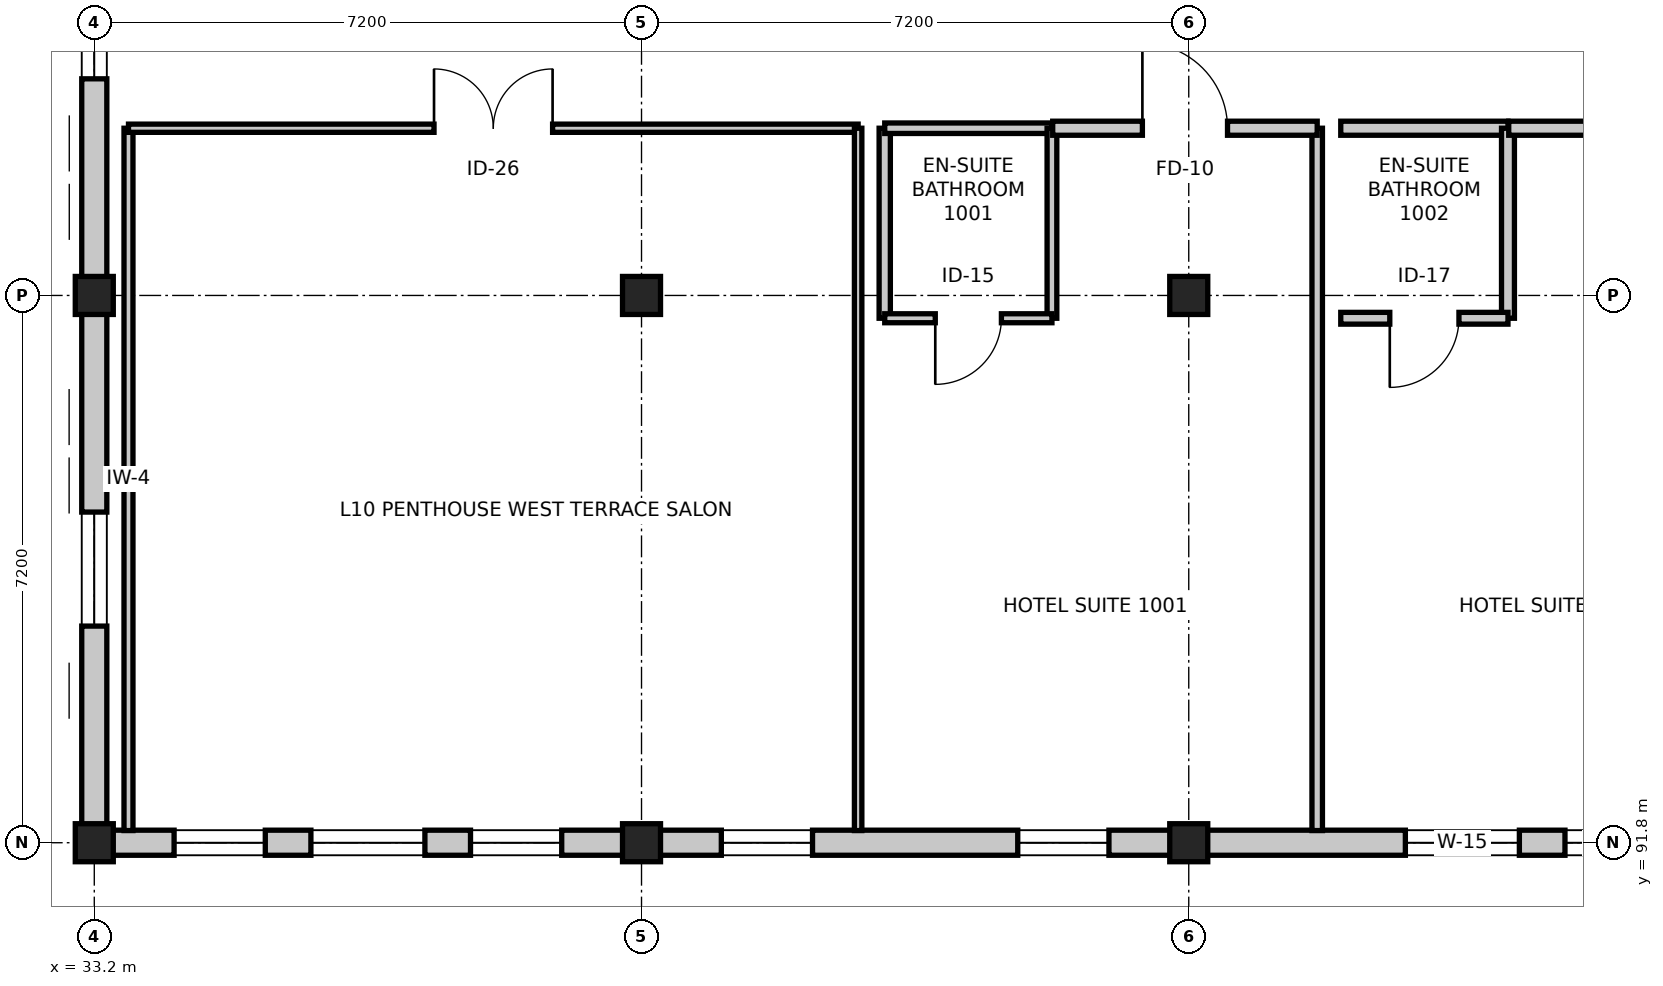
"""IFC4 building model, lengths in metres.
Left out: names, types, materials, properties, quantities, classifications, styles, units other than length and angle.
Written with IfcOpenShell. Run it as: python <this file> out.ifc"""

import sys

from ifc_helpers import new_model, si_unit, direction, frame, frame_2d, origin, origin_2d, place, context, subcontext, project, spatial, rectangle, extrude, element, fill, save


model = new_model("IFC4")
c1 = context("Model", 3, precision=1e-05, world=origin(), true_north=direction((0.0, 1.0)))
c2 = subcontext(c1, "Body", "Model", "MODEL_VIEW")
j1 = project(units=[si_unit("LENGTHUNIT", "METRE"), si_unit("PLANEANGLEUNIT", "RADIAN")], contexts=[c1])
p1 = place(None, origin())
s1 = spatial("IfcSite", under=j1, at=p1, CompositionType="ELEMENT")
p2 = place(p1, origin())
s2 = spatial("IfcBuilding", under=s1, at=p2, CompositionType="ELEMENT")
p3 = place(p2, frame((0.0, 0.0, 40.8)))
s3 = spatial("IfcBuildingStorey", under=s2, at=p3, CompositionType="ELEMENT", Elevation=40.8)
for number, where, z_axis, x_axis in (
    (1, (33.2, 91.8, 0.0), (0.0, 0.0, 1.0), (1.0, 0.0, 0.0)),
    (2, (33.2, 99.0, 0.0), (0.0, 0.0, 1.0), (1.0, 0.0, 0.0)),
    (3, (40.4, 91.8, 0.0), (0.0, 0.0, 1.0), (1.0, 0.0, 0.0)),
    (4, (40.4, 99.0, 0.0), (0.0, 0.0, 1.0), (1.0, 0.0, 0.0)),
    (5, (47.6, 91.8, 0.0), (0.0, 0.0, 1.0), (1.0, 0.0, 0.0)),
    (6, (47.6, 99.0, 0.0), (0.0, 0.0, 1.0), (1.0, 0.0, 0.0)),
):
    element("IfcColumn", number, at=place(p3, frame(where, z_axis=z_axis, x_axis=x_axis)), inside=s3, PredefinedType="COLUMN", context=c2, shape_type="SweptSolid", body=[
        extrude(rectangle(XDim=0.5, YDim=0.5, at=origin_2d()), origin(), (0.0, 0.0, 1.0), 3.6),
    ])
p4 = place(p3, frame((54.8, 91.8, 0.0), z_axis=(0.0, 0.0, 1.0), x_axis=(-1.0, 0.0, 0.0)))
e7 = element("IfcWall", 7, at=p4, inside=s3, PredefinedType="STANDARD", context=c2, shape_type="SweptSolid", body=[
    extrude(rectangle(XDim=7.2, YDim=0.33, at=frame_2d((3.6, 0.0))), origin(), (0.0, 0.0, 1.0), 2.765),
])
p5 = place(p4, frame((2.85, 0.0, 0.75)))
e8 = element("IfcOpeningElement", 8, at=p5, cuts=e7, PredefinedType="OPENING", context=c2, shape_type="SweptSolid", body=[
    extrude(rectangle(XDim=1.5, YDim=1.5, at=frame_2d((0.75, 0.75))), frame((0.0, 0.175, 0.0), z_axis=(0.0, -1.0, 0.0), x_axis=(1.0, 0.0, 0.0)), (0.0, 0.0, 1.0), 0.35),
])
p6 = place(p4, frame((1.05, 0.0, 0.85)))
e9 = element("IfcOpeningElement", 9, at=p6, cuts=e7, PredefinedType="OPENING", context=c2, shape_type="SweptSolid", body=[
    extrude(rectangle(XDim=1.2, YDim=1.8, at=frame_2d((0.6, 0.9))), frame((0.0, 0.175, 0.0), z_axis=(0.0, -1.0, 0.0), x_axis=(1.0, 0.0, 0.0)), (0.0, 0.0, 1.0), 0.35),
])
p7 = place(p3, frame((47.6, 91.8, 0.0), z_axis=(0.0, 0.0, 1.0), x_axis=(-1.0, 0.0, 0.0)))
e10 = element("IfcWall", 10, at=p7, inside=s3, PredefinedType="STANDARD", context=c2, shape_type="SweptSolid", body=[
    extrude(rectangle(XDim=7.2, YDim=0.33, at=frame_2d((3.6, 0.0))), origin(), (0.0, 0.0, 1.0), 2.765),
])
p8 = place(p7, frame((1.05, 0.0, 0.85)))
e11 = element("IfcOpeningElement", 11, at=p8, cuts=e10, PredefinedType="OPENING", context=c2, shape_type="SweptSolid", body=[
    extrude(rectangle(XDim=1.2, YDim=1.8, at=frame_2d((0.6, 0.9))), frame((0.0, 0.175, 0.0), z_axis=(0.0, -1.0, 0.0), x_axis=(1.0, 0.0, 0.0)), (0.0, 0.0, 1.0), 0.35),
])
p9 = place(p7, frame((4.95, 0.0, 0.85)))
e12 = element("IfcOpeningElement", 12, at=p9, cuts=e10, PredefinedType="OPENING", context=c2, shape_type="SweptSolid", body=[
    extrude(rectangle(XDim=1.2, YDim=1.8, at=frame_2d((0.6, 0.9))), frame((0.0, 0.175, 0.0), z_axis=(0.0, -1.0, 0.0), x_axis=(1.0, 0.0, 0.0)), (0.0, 0.0, 1.0), 0.35),
])
p10 = place(p3, frame((40.4, 91.8, 0.0), z_axis=(0.0, 0.0, 1.0), x_axis=(-1.0, 0.0, 0.0)))
e13 = element("IfcWall", 13, at=p10, inside=s3, PredefinedType="STANDARD", context=c2, shape_type="SweptSolid", body=[
    extrude(rectangle(XDim=7.2, YDim=0.33, at=frame_2d((3.6, 0.0))), origin(), (0.0, 0.0, 1.0), 2.765),
])
p11 = place(p10, frame((2.85, 0.0, 0.75)))
e14 = element("IfcOpeningElement", 14, at=p11, cuts=e13, PredefinedType="OPENING", context=c2, shape_type="SweptSolid", body=[
    extrude(rectangle(XDim=1.5, YDim=1.5, at=frame_2d((0.75, 0.75))), frame((0.0, 0.175, 0.0), z_axis=(0.0, -1.0, 0.0), x_axis=(1.0, 0.0, 0.0)), (0.0, 0.0, 1.0), 0.35),
])
p12 = place(p10, frame((1.05, 0.0, 0.85)))
e15 = element("IfcOpeningElement", 15, at=p12, cuts=e13, PredefinedType="OPENING", context=c2, shape_type="SweptSolid", body=[
    extrude(rectangle(XDim=1.2, YDim=1.8, at=frame_2d((0.6, 0.9))), frame((0.0, 0.175, 0.0), z_axis=(0.0, -1.0, 0.0), x_axis=(1.0, 0.0, 0.0)), (0.0, 0.0, 1.0), 0.35),
])
p13 = place(p10, frame((4.95, 0.0, 0.85)))
e16 = element("IfcOpeningElement", 16, at=p13, cuts=e13, PredefinedType="OPENING", context=c2, shape_type="SweptSolid", body=[
    extrude(rectangle(XDim=1.2, YDim=1.8, at=frame_2d((0.6, 0.9))), frame((0.0, 0.175, 0.0), z_axis=(0.0, -1.0, 0.0), x_axis=(1.0, 0.0, 0.0)), (0.0, 0.0, 1.0), 0.35),
])
p14 = place(p3, frame((33.2, 91.8, 0.0), z_axis=(0.0, 0.0, 1.0), x_axis=(0.0, 1.0, 0.0)))
e17 = element("IfcWall", 17, at=p14, inside=s3, PredefinedType="STANDARD", context=c2, shape_type="SweptSolid", body=[
    extrude(rectangle(XDim=7.2, YDim=0.33, at=frame_2d((3.6, 0.0))), origin(), (0.0, 0.0, 1.0), 2.715),
])
p15 = place(p14, frame((2.85, 0.0, 0.75)))
e18 = element("IfcOpeningElement", 18, at=p15, cuts=e17, PredefinedType="OPENING", context=c2, shape_type="SweptSolid", body=[
    extrude(rectangle(XDim=1.5, YDim=1.5, at=frame_2d((0.75, 0.75))), frame((0.0, 0.175, 0.0), z_axis=(0.0, -1.0, 0.0), x_axis=(1.0, 0.0, 0.0)), (0.0, 0.0, 1.0), 0.35),
])
p16 = place(p3, frame((33.2, 99.0, 0.0), z_axis=(0.0, 0.0, 1.0), x_axis=(0.0, 1.0, 0.0)))
e19 = element("IfcWall", 19, at=p16, inside=s3, PredefinedType="STANDARD", context=c2, shape_type="SweptSolid", body=[
    extrude(rectangle(XDim=7.2, YDim=0.33, at=frame_2d((3.6, 0.0))), origin(), (0.0, 0.0, 1.0), 2.715),
])
p17 = place(p16, frame((2.85, 0.0, 0.75)))
e20 = element("IfcOpeningElement", 20, at=p17, cuts=e19, PredefinedType="OPENING", context=c2, shape_type="SweptSolid", body=[
    extrude(rectangle(XDim=1.5, YDim=1.5, at=frame_2d((0.75, 0.75))), frame((0.0, 0.175, 0.0), z_axis=(0.0, -1.0, 0.0), x_axis=(1.0, 0.0, 0.0)), (0.0, 0.0, 1.0), 0.35),
])
p18 = place(p3, frame((33.65, 91.96, 0.0), z_axis=(0.0, 0.0, 1.0), x_axis=(0.0, 1.0, 0.0)))
e21 = element("IfcWall", 21, at=p18, inside=s3, PredefinedType="PARTITIONING", context=c2, shape_type="SweptSolid", body=[
    extrude(rectangle(XDim=9.24, YDim=0.118, at=frame_2d((4.62, 0.0))), origin(), (0.0, 0.0, 1.0), 2.765),
])
p19 = place(p3, frame((33.65, 101.2, 0.0), z_axis=(0.0, 0.0, 1.0), x_axis=(1.0, 0.0, 0.0)))
e22 = element("IfcWall", 22, at=p19, inside=s3, PredefinedType="PARTITIONING", context=c2, shape_type="SweptSolid", body=[
    extrude(rectangle(XDim=9.6, YDim=0.108, at=frame_2d((4.8, 0.0))), origin(), (0.0, 0.0, 1.0), 2.715),
])
p20 = place(p19, frame((4.02, 0.0, 0.0)))
e23 = element("IfcOpeningElement", 23, at=p20, cuts=e22, PredefinedType="OPENING", context=c2, shape_type="SweptSolid", body=[
    extrude(rectangle(XDim=1.56, YDim=2.26, at=frame_2d((0.78, 1.13))), frame((0.0, 0.064, 0.0), z_axis=(0.0, -1.0, 0.0), x_axis=(1.0, 0.0, 0.0)), (0.0, 0.0, 1.0), 0.128),
])
p21 = place(p3, frame((43.25, 101.2, 0.0), z_axis=(0.0, 0.0, 1.0), x_axis=(0.0, -1.0, 0.0)))
e24 = element("IfcWall", 24, at=p21, inside=s3, PredefinedType="PARTITIONING", context=c2, shape_type="SweptSolid", body=[
    extrude(rectangle(XDim=9.24, YDim=0.098, at=frame_2d((4.62, 0.0))), origin(), (0.0, 0.0, 1.0), 2.765),
])
p22 = place(p3, frame((43.6, 98.7, 0.0), z_axis=(0.0, 0.0, 1.0), x_axis=(0.0, 1.0, 0.0)))
e25 = element("IfcWall", 25, at=p22, inside=s3, PredefinedType="PARTITIONING", context=c2, shape_type="SweptSolid", body=[
    extrude(rectangle(XDim=2.5, YDim=0.148, at=frame_2d((1.25, 0.0))), origin(), (0.0, 0.0, 1.0), 2.765),
])
p23 = place(p3, frame((43.6, 101.2, 0.0), z_axis=(0.0, 0.0, 1.0), x_axis=(1.0, 0.0, 0.0)))
e26 = element("IfcWall", 26, at=p23, inside=s3, PredefinedType="PARTITIONING", context=c2, shape_type="SweptSolid", body=[
    extrude(rectangle(XDim=2.2, YDim=0.138, at=frame_2d((1.1, 0.0))), origin(), (0.0, 0.0, 1.0), 3.38),
])
p24 = place(p3, frame((45.8, 101.2, 0.0), z_axis=(0.0, 0.0, 1.0), x_axis=(0.0, -1.0, 0.0)))
e27 = element("IfcWall", 27, at=p24, inside=s3, PredefinedType="PARTITIONING", context=c2, shape_type="SweptSolid", body=[
    extrude(rectangle(XDim=2.5, YDim=0.128, at=frame_2d((1.25, 0.0))), origin(), (0.0, 0.0, 1.0), 2.765),
])
p25 = place(p3, frame((45.8, 98.7, 0.0), z_axis=(0.0, 0.0, 1.0), x_axis=(-1.0, 0.0, 0.0)))
e28 = element("IfcWall", 28, at=p25, inside=s3, PredefinedType="PARTITIONING", context=c2, shape_type="SweptSolid", body=[
    extrude(rectangle(XDim=2.2, YDim=0.118, at=frame_2d((1.1, 0.0))), origin(), (0.0, 0.0, 1.0), 3.38),
])
p26 = place(p25, frame((0.665, 0.0, 0.0)))
e29 = element("IfcOpeningElement", 29, at=p26, cuts=e28, PredefinedType="OPENING", context=c2, shape_type="SweptSolid", body=[
    extrude(rectangle(XDim=0.87, YDim=2.07, at=frame_2d((0.435, 1.035))), frame((0.0, 0.069, 0.0), z_axis=(0.0, -1.0, 0.0), x_axis=(1.0, 0.0, 0.0)), (0.0, 0.0, 1.0), 0.138),
])
p27 = place(p3, frame((49.29, 101.2, 0.0), z_axis=(0.0, 0.0, 1.0), x_axis=(0.0, -1.0, 0.0)))
e30 = element("IfcWall", 30, at=p27, inside=s3, PredefinedType="PARTITIONING", context=c2, shape_type="SweptSolid", body=[
    extrude(rectangle(XDim=9.24, YDim=0.138, at=frame_2d((4.62, 0.0))), origin(), (0.0, 0.0, 1.0), 2.765),
])
p28 = place(p3, frame((45.81, 101.2, 0.0), z_axis=(0.0, 0.0, 1.0), x_axis=(1.0, 0.0, 0.0)))
e31 = element("IfcWall", 31, at=p28, inside=s3, PredefinedType="PARTITIONING", context=c2, shape_type="SweptSolid", body=[
    extrude(rectangle(XDim=3.48, YDim=0.185, at=frame_2d((1.74, 0.0))), origin(), (0.0, 0.0, 1.0), 2.715),
])
p29 = place(p28, frame((1.18, 0.0, 0.0)))
e32 = element("IfcOpeningElement", 32, at=p29, cuts=e31, PredefinedType="OPENING", context=c2, shape_type="SweptSolid", body=[
    extrude(rectangle(XDim=1.12, YDim=2.2, at=frame_2d((0.56, 1.1))), frame((0.0, 0.103, 0.0), z_axis=(0.0, -1.0, 0.0), x_axis=(1.0, 0.0, 0.0)), (0.0, 0.0, 1.0), 0.205),
])
p30 = place(p3, frame((49.6, 101.2, 0.0), z_axis=(0.0, 0.0, 1.0), x_axis=(1.0, 0.0, 0.0)))
e33 = element("IfcWall", 33, at=p30, inside=s3, PredefinedType="PARTITIONING", context=c2, shape_type="SweptSolid", body=[
    extrude(rectangle(XDim=2.2, YDim=0.185, at=frame_2d((1.1, 0.0))), origin(), (0.0, 0.0, 1.0), 3.38),
])
p31 = place(p3, frame((51.8, 101.2, 0.0), z_axis=(0.0, 0.0, 1.0), x_axis=(0.0, -1.0, 0.0)))
e34 = element("IfcWall", 34, at=p31, inside=s3, PredefinedType="PARTITIONING", context=c2, shape_type="SweptSolid", body=[
    extrude(rectangle(XDim=2.5, YDim=0.17, at=frame_2d((1.25, 0.0))), origin(), (0.0, 0.0, 1.0), 2.765),
])
p32 = place(p3, frame((51.8, 98.7, 0.0), z_axis=(0.0, 0.0, 1.0), x_axis=(-1.0, 0.0, 0.0)))
e35 = element("IfcWall", 35, at=p32, inside=s3, PredefinedType="PARTITIONING", context=c2, shape_type="SweptSolid", body=[
    extrude(rectangle(XDim=2.2, YDim=0.155, at=frame_2d((1.1, 0.0))), origin(), (0.0, 0.0, 1.0), 3.38),
])
p33 = place(p32, frame((0.645, 0.0, 0.0)))
e36 = element("IfcOpeningElement", 36, at=p33, cuts=e35, PredefinedType="OPENING", context=c2, shape_type="SweptSolid", body=[
    extrude(rectangle(XDim=0.91, YDim=2.11, at=frame_2d((0.455, 1.055))), frame((0.0, 0.087, 0.0), z_axis=(0.0, -1.0, 0.0), x_axis=(1.0, 0.0, 0.0)), (0.0, 0.0, 1.0), 0.175),
])
p34 = place(p3, frame((51.81, 101.2, 0.0), z_axis=(0.0, 0.0, 1.0), x_axis=(1.0, 0.0, 0.0)))
e37 = element("IfcWall", 37, at=p34, inside=s3, PredefinedType="PARTITIONING", context=c2, shape_type="SweptSolid", body=[
    extrude(rectangle(XDim=3.48, YDim=0.185, at=frame_2d((1.74, 0.0))), origin(), (0.0, 0.0, 1.0), 2.715),
])
p35 = place(p34, frame((1.25, 0.0, 0.0)))
e38 = element("IfcOpeningElement", 38, at=p35, cuts=e37, PredefinedType="OPENING", context=c2, shape_type="SweptSolid", body=[
    extrude(rectangle(XDim=0.98, YDim=2.15, at=frame_2d((0.49, 1.075))), frame((0.0, 0.103, 0.0), z_axis=(0.0, -1.0, 0.0), x_axis=(1.0, 0.0, 0.0)), (0.0, 0.0, 1.0), 0.205),
])
p36 = place(p5, origin())
e39 = element("IfcWindow", 39, at=p36, inside=s3, PartitioningType="SINGLE_PANEL", PredefinedType="WINDOW", context=c2, shape_type="SweptSolid", body=[
    extrude(rectangle(XDim=1.5, YDim=1.5, at=frame_2d((0.75, 0.75))), frame((0.0, 0.03, 0.0), z_axis=(0.0, -1.0, 0.0), x_axis=(1.0, 0.0, 0.0)), (0.0, 0.0, 1.0), 0.06),
])
fill(e8, e39)
p37 = place(p6, origin())
e40 = element("IfcWindow", 40, at=p37, inside=s3, PartitioningType="SINGLE_PANEL", PredefinedType="WINDOW", context=c2, shape_type="SweptSolid", body=[
    extrude(rectangle(XDim=1.2, YDim=1.8, at=frame_2d((0.6, 0.9))), frame((0.0, 0.03, 0.0), z_axis=(0.0, -1.0, 0.0), x_axis=(1.0, 0.0, 0.0)), (0.0, 0.0, 1.0), 0.06),
])
fill(e9, e40)
p38 = place(p8, origin())
e41 = element("IfcWindow", 41, at=p38, inside=s3, PartitioningType="SINGLE_PANEL", PredefinedType="WINDOW", context=c2, shape_type="SweptSolid", body=[
    extrude(rectangle(XDim=1.2, YDim=1.8, at=frame_2d((0.6, 0.9))), frame((0.0, 0.03, 0.0), z_axis=(0.0, -1.0, 0.0), x_axis=(1.0, 0.0, 0.0)), (0.0, 0.0, 1.0), 0.06),
])
fill(e11, e41)
p39 = place(p9, origin())
e42 = element("IfcWindow", 42, at=p39, inside=s3, PartitioningType="SINGLE_PANEL", PredefinedType="WINDOW", context=c2, shape_type="SweptSolid", body=[
    extrude(rectangle(XDim=1.2, YDim=1.8, at=frame_2d((0.6, 0.9))), frame((0.0, 0.03, 0.0), z_axis=(0.0, -1.0, 0.0), x_axis=(1.0, 0.0, 0.0)), (0.0, 0.0, 1.0), 0.06),
])
fill(e12, e42)
p40 = place(p11, origin())
e43 = element("IfcWindow", 43, at=p40, inside=s3, PartitioningType="SINGLE_PANEL", PredefinedType="WINDOW", context=c2, shape_type="SweptSolid", body=[
    extrude(rectangle(XDim=1.5, YDim=1.5, at=frame_2d((0.75, 0.75))), frame((0.0, 0.03, 0.0), z_axis=(0.0, -1.0, 0.0), x_axis=(1.0, 0.0, 0.0)), (0.0, 0.0, 1.0), 0.06),
])
fill(e14, e43)
p41 = place(p12, origin())
e44 = element("IfcWindow", 44, at=p41, inside=s3, PartitioningType="SINGLE_PANEL", PredefinedType="WINDOW", context=c2, shape_type="SweptSolid", body=[
    extrude(rectangle(XDim=1.2, YDim=1.8, at=frame_2d((0.6, 0.9))), frame((0.0, 0.03, 0.0), z_axis=(0.0, -1.0, 0.0), x_axis=(1.0, 0.0, 0.0)), (0.0, 0.0, 1.0), 0.06),
])
fill(e15, e44)
p42 = place(p13, origin())
e45 = element("IfcWindow", 45, at=p42, inside=s3, PartitioningType="SINGLE_PANEL", PredefinedType="WINDOW", context=c2, shape_type="SweptSolid", body=[
    extrude(rectangle(XDim=1.2, YDim=1.8, at=frame_2d((0.6, 0.9))), frame((0.0, 0.03, 0.0), z_axis=(0.0, -1.0, 0.0), x_axis=(1.0, 0.0, 0.0)), (0.0, 0.0, 1.0), 0.06),
])
fill(e16, e45)
p43 = place(p15, origin())
e46 = element("IfcWindow", 46, at=p43, inside=s3, PartitioningType="SINGLE_PANEL", PredefinedType="WINDOW", context=c2, shape_type="SweptSolid", body=[
    extrude(rectangle(XDim=1.5, YDim=1.5, at=frame_2d((0.75, 0.75))), frame((0.0, 0.03, 0.0), z_axis=(0.0, -1.0, 0.0), x_axis=(1.0, 0.0, 0.0)), (0.0, 0.0, 1.0), 0.06),
])
fill(e18, e46)
p44 = place(p17, origin())
e47 = element("IfcWindow", 47, at=p44, inside=s3, PartitioningType="SINGLE_PANEL", PredefinedType="WINDOW", context=c2, shape_type="SweptSolid", body=[
    extrude(rectangle(XDim=1.5, YDim=1.5, at=frame_2d((0.75, 0.75))), frame((0.0, 0.03, 0.0), z_axis=(0.0, -1.0, 0.0), x_axis=(1.0, 0.0, 0.0)), (0.0, 0.0, 1.0), 0.06),
])
fill(e20, e47)
p45 = place(p20, origin())
e48 = element("IfcDoor", 48, at=p45, inside=s3, OperationType="DOUBLE_DOOR_SINGLE_SWING", PredefinedType="DOOR", context=c2, shape_type="SweptSolid", body=[
    extrude(rectangle(XDim=1.56, YDim=2.26, at=frame_2d((0.78, 1.13))), frame((0.0, 0.025, 0.0), z_axis=(0.0, -1.0, 0.0), x_axis=(1.0, 0.0, 0.0)), (0.0, 0.0, 1.0), 0.05),
])
fill(e23, e48)
p46 = place(p26, origin())
e49 = element("IfcDoor", 49, at=p46, inside=s3, OperationType="SINGLE_SWING_RIGHT", PredefinedType="DOOR", context=c2, shape_type="SweptSolid", body=[
    extrude(rectangle(XDim=0.87, YDim=2.07, at=frame_2d((0.435, 1.035))), frame((0.0, 0.025, 0.0), z_axis=(0.0, -1.0, 0.0), x_axis=(1.0, 0.0, 0.0)), (0.0, 0.0, 1.0), 0.05),
])
fill(e29, e49)
p47 = place(p29, origin())
e50 = element("IfcDoor", 50, at=p47, inside=s3, OperationType="SINGLE_SWING_LEFT", PredefinedType="DOOR", context=c2, shape_type="SweptSolid", body=[
    extrude(rectangle(XDim=1.12, YDim=2.2, at=frame_2d((0.56, 1.1))), frame((0.0, 0.025, 0.0), z_axis=(0.0, -1.0, 0.0), x_axis=(1.0, 0.0, 0.0)), (0.0, 0.0, 1.0), 0.05),
])
fill(e32, e50)
p48 = place(p33, origin())
e51 = element("IfcDoor", 51, at=p48, inside=s3, OperationType="SINGLE_SWING_RIGHT", PredefinedType="DOOR", context=c2, shape_type="SweptSolid", body=[
    extrude(rectangle(XDim=0.91, YDim=2.11, at=frame_2d((0.455, 1.055))), frame((0.0, 0.025, 0.0), z_axis=(0.0, -1.0, 0.0), x_axis=(1.0, 0.0, 0.0)), (0.0, 0.0, 1.0), 0.05),
])
fill(e36, e51)
save(model, sys.argv[1])
